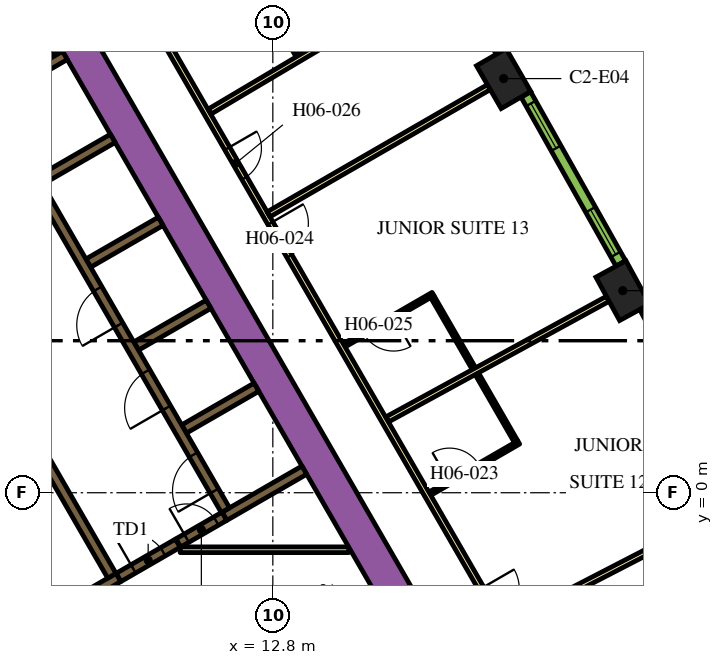
"""IFC4 building model, lengths in metres.
Left out: names, types, materials, properties, quantities, classifications, styles, units other than length and angle.
Written with IfcOpenShell. Run it as: python <this file> out.ifc"""

import sys

from ifc_helpers import new_model, si_unit, direction, frame, frame_2d, origin, origin_2d, place, context, subcontext, project, spatial, rectangle, extrude, element, fill, save


model = new_model("IFC4")
c1 = context("Model", 3, precision=1e-05, world=origin(), true_north=direction((0.0, 1.0)))
c2 = subcontext(c1, "Body", "Model", "MODEL_VIEW")
j1 = project(units=[si_unit("LENGTHUNIT", "METRE"), si_unit("PLANEANGLEUNIT", "RADIAN")], contexts=[c1])
p1 = place(None, origin())
s1 = spatial("IfcSite", under=j1, at=p1, CompositionType="ELEMENT")
p2 = place(p1, origin())
s2 = spatial("IfcBuilding", under=s1, at=p2, CompositionType="ELEMENT")
p3 = place(p2, frame((0.0, 0.0, 91.5)))
s3 = spatial("IfcBuildingStorey", under=s2, at=p3, CompositionType="ELEMENT", Elevation=91.5)
for number, where, z_axis, x_axis in (
    (1, (22.009, 5.317, 0.0), (0.0, 0.0, 1.0), (-0.48, 0.877, 0.0)),
    (2, (18.874, 10.897, 0.0), (0.0, 0.0, 1.0), (-0.5, 0.866, 0.0)),
):
    element("IfcColumn", number, at=place(p3, frame(where, z_axis=z_axis, x_axis=x_axis)), inside=s3, PredefinedType="COLUMN", context=c2, shape_type="SweptSolid", body=[
        extrude(rectangle(XDim=1.3, YDim=0.9, at=origin_2d()), origin(), (0.0, 0.0, 1.0), 3.9),
    ])
p4 = place(p3, frame((6.776, 13.364, 0.0), z_axis=(0.0, 0.0, 1.0), x_axis=(0.500004177138, -0.8660229921, 0.0)))
e3 = element("IfcWall", 3, at=p4, inside=s3, PredefinedType="SOLIDWALL", context=c2, shape_type="SweptSolid", body=[
    extrude(rectangle(XDim=20.204, YDim=0.9, at=frame_2d((10.102, 0.0))), origin(), (0.0, 0.0, 1.0), 3.9),
])
p5 = place(p3, frame((10.464, 1.677, 0.0), z_axis=(0.0, 0.0, 1.0), x_axis=(0.86605622881, 0.499946605688, 0.0)))
e4 = element("IfcWall", 4, at=p5, inside=s3, PredefinedType="SOLIDWALL", context=c2, shape_type="SweptSolid", body=[
    extrude(rectangle(XDim=2.2, YDim=0.25, at=frame_2d((1.1, 0.0))), origin(), (0.0, 0.0, 1.0), 3.9),
])
p6 = place(p3, frame((13.629, 0.594, 0.0), z_axis=(0.0, 0.0, 1.0), x_axis=(-0.866063384774, -0.499934209226, 0.0)))
e5 = element("IfcWall", 5, at=p6, inside=s3, PredefinedType="SOLIDWALL", context=c2, shape_type="SweptSolid", body=[
    extrude(rectangle(XDim=2.428, YDim=0.25, at=frame_2d((1.214, 0.0))), origin(), (0.0, 0.0, 1.0), 3.9),
])
p7 = place(p3, frame((5.356, 10.367, 0.0), z_axis=(0.0, 0.0, 1.0), x_axis=(0.865978535641, 0.50008116922, 0.0)))
e6 = element("IfcWall", 6, at=p7, inside=s3, PredefinedType="SOLIDWALL", context=c2, shape_type="SweptSolid", body=[
    extrude(rectangle(XDim=2.278, YDim=0.25, at=frame_2d((1.139, 0.0))), origin(), (0.0, 0.0, 1.0), 3.9),
])
p8 = place(p3, frame((6.614, -3.456, 0.0), z_axis=(0.0, 0.0, 1.0), x_axis=(0.866031582473, 0.499989298045, 0.0)))
e7 = element("IfcWall", 7, at=p8, inside=s3, PredefinedType="SOLIDWALL", context=c2, shape_type="SweptSolid", body=[
    extrude(rectangle(XDim=2.455, YDim=0.25, at=frame_2d((1.228, 0.0))), origin(), (0.0, 0.0, 1.0), 3.9),
])
for number, where, z_axis, x_axis in (
    (8, (6.684, 8.224, 0.0), (0.0, 0.0, 1.0), (0.866, 0.5, 0.0)),
    (9, (7.944, 6.041, 0.0), (0.0, 0.0, 1.0), (0.866, 0.5, 0.0)),
    (10, (9.204, 3.859, 0.0), (0.0, 0.0, 1.0), (0.866, 0.5, 0.0)),
):
    element("IfcWall", number, at=place(p3, frame(where, z_axis=z_axis, x_axis=x_axis)), inside=s3, PredefinedType="SOLIDWALL", context=c2, shape_type="SweptSolid", body=[
        extrude(rectangle(XDim=2.2, YDim=0.25, at=frame_2d((1.1, 0.0))), origin(), (0.0, 0.0, 1.0), 3.9),
    ])
p9 = place(p3, frame((10.362, -1.5, 0.0), z_axis=(0.0, 0.0, 1.0), x_axis=(1.0, 0.0, 0.0)))
e11 = element("IfcWall", 11, at=p9, inside=s3, PredefinedType="PARTITIONING", context=c2, shape_type="SweptSolid", body=[
    extrude(rectangle(XDim=4.439, YDim=0.15, at=frame_2d((2.22, 0.0))), origin(), (0.0, 0.0, 1.0), 2.75),
])
p10 = place(p3, frame((6.872, 11.45, 0.0), z_axis=(0.0, 0.0, 1.0), x_axis=(0.499846793097, 0.866113839764, 0.0)))
e12 = element("IfcWall", 12, at=p10, inside=s3, PredefinedType="PARTITIONING", context=c2, shape_type="SweptSolid", body=[
    extrude(rectangle(XDim=0.453, YDim=0.15, at=frame_2d((0.227, 0.0))), origin(), (0.0, 0.0, 1.0), 2.75),
])
p11 = place(p3, frame((7.131, 11.6, 0.0), z_axis=(0.0, 0.0, 1.0), x_axis=(0.498600033135, 0.866832167699, 0.0)))
e13 = element("IfcWall", 13, at=p11, inside=s3, PredefinedType="PARTITIONING", context=c2, shape_type="SweptSolid", body=[
    extrude(rectangle(XDim=0.107, YDim=0.15, at=frame_2d((0.053, 0.0))), origin(), (0.0, 0.0, 1.0), 2.75),
])
p12 = place(p3, frame((11.553, -0.46, 0.0), z_axis=(0.0, 0.0, 1.0), x_axis=(-0.500006514828, 0.866021642414, 0.0)))
e14 = element("IfcWall", 14, at=p12, inside=s3, PredefinedType="SOLIDWALL", context=c2, shape_type="SweptSolid", body=[
    extrude(rectangle(XDim=12.35, YDim=0.25, at=frame_2d((6.175, 0.0))), origin(), (0.0, 0.0, 1.0), 3.9),
])
p13 = place(p12, frame((0.585, 0.0, 0.0)))
e15 = element("IfcOpeningElement", 15, at=p13, cuts=e14, PredefinedType="OPENING", context=c2, shape_type="SweptSolid", body=[
    extrude(rectangle(XDim=1.1, YDim=2.1, at=frame_2d((0.55, 1.05))), frame((0.0, 0.135, 0.0), z_axis=(0.0, -1.0, 0.0), x_axis=(1.0, 0.0, 0.0)), (0.0, 0.0, 1.0), 0.27),
])
p14 = place(p12, frame((3.105, 0.0, 0.0)))
e16 = element("IfcOpeningElement", 16, at=p14, cuts=e14, PredefinedType="OPENING", context=c2, shape_type="SweptSolid", body=[
    extrude(rectangle(XDim=1.1, YDim=2.1, at=frame_2d((0.55, 1.05))), frame((0.0, 0.135, 0.0), z_axis=(0.0, -1.0, 0.0), x_axis=(1.0, 0.0, 0.0)), (0.0, 0.0, 1.0), 0.27),
])
p15 = place(p12, frame((5.625, 0.0, 0.0)))
e17 = element("IfcOpeningElement", 17, at=p15, cuts=e14, PredefinedType="OPENING", context=c2, shape_type="SweptSolid", body=[
    extrude(rectangle(XDim=1.1, YDim=2.1, at=frame_2d((0.55, 1.05))), frame((0.0, 0.135, 0.0), z_axis=(0.0, -1.0, 0.0), x_axis=(1.0, 0.0, 0.0)), (0.0, 0.0, 1.0), 0.27),
])
p16 = place(p3, frame((8.565, -2.185, 0.0), z_axis=(0.0, 0.0, 1.0), x_axis=(-0.499997954832, 0.866026584559, 0.0)))
e18 = element("IfcWall", 18, at=p16, inside=s3, PredefinedType="SOLIDWALL", context=c2, shape_type="SweptSolid", body=[
    extrude(rectangle(XDim=12.35, YDim=0.25, at=frame_2d((6.175, 0.0))), origin(), (0.0, 0.0, 1.0), 3.9),
])
p17 = place(p16, frame((5.725, 0.0, 0.0)))
e19 = element("IfcOpeningElement", 19, at=p17, cuts=e18, PredefinedType="OPENING", context=c2, shape_type="SweptSolid", body=[
    extrude(rectangle(XDim=0.9, YDim=2.1, at=frame_2d((0.45, 1.05))), frame((0.0, 0.135, 0.0), z_axis=(0.0, -1.0, 0.0), x_axis=(1.0, 0.0, 0.0)), (0.0, 0.0, 1.0), 0.27),
])
p18 = place(p3, frame((8.74, -2.229, 0.0), z_axis=(0.0, 0.0, 1.0), x_axis=(0.865989075817, 0.500062916607, 0.0)))
e20 = element("IfcWall", 20, at=p18, inside=s3, PredefinedType="SOLIDWALL", context=c2, shape_type="SweptSolid", body=[
    extrude(rectangle(XDim=1.8, YDim=0.25, at=frame_2d((0.9, 0.0))), origin(), (0.0, 0.0, 1.0), 3.9),
])
p19 = place(p18, frame((0.45, 0.0, 0.0)))
e21 = element("IfcOpeningElement", 21, at=p19, cuts=e20, PredefinedType="OPENING", context=c2, shape_type="SweptSolid", body=[
    extrude(rectangle(XDim=0.9, YDim=2.1, at=frame_2d((0.45, 1.05))), frame((0.0, 0.135, 0.0), z_axis=(0.0, -1.0, 0.0), x_axis=(1.0, 0.0, 0.0)), (0.0, 0.0, 1.0), 0.27),
])
p20 = place(p3, frame((10.313, -1.32, 0.0), z_axis=(0.0, 0.0, 1.0), x_axis=(0.866034573852, 0.49998411664, 0.0)))
e22 = element("IfcWall", 22, at=p20, inside=s3, PredefinedType="SOLIDWALL", context=c2, shape_type="SweptSolid", body=[
    extrude(rectangle(XDim=1.4, YDim=0.25, at=frame_2d((0.7, 0.0))), origin(), (0.0, 0.0, 1.0), 3.9),
])
p21 = place(p20, frame((0.25, 0.0, 0.0)))
e23 = element("IfcOpeningElement", 23, at=p21, cuts=e22, PredefinedType="OPENING", context=c2, shape_type="SweptSolid", body=[
    extrude(rectangle(XDim=0.9, YDim=2.1, at=frame_2d((0.45, 1.05))), frame((0.0, 0.135, 0.0), z_axis=(0.0, -1.0, 0.0), x_axis=(1.0, 0.0, 0.0)), (0.0, 0.0, 1.0), 0.27),
])
p22 = place(p3, frame((6.163, 18.475, 0.0), z_axis=(0.0, 0.0, 1.0), x_axis=(0.500001317485, -0.866024643133, 0.0)))
e24 = element("IfcWall", 24, at=p22, inside=s3, PredefinedType="PARTITIONING", context=c2, shape_type="SweptSolid", body=[
    extrude(rectangle(XDim=25.767, YDim=0.15, at=frame_2d((12.883, 0.0))), origin(), (0.0, 0.0, 1.0), 2.75),
])
p23 = place(p22, frame((24.241, 0.0, 0.0)))
e25 = element("IfcOpeningElement", 25, at=p23, cuts=e24, PredefinedType="OPENING", context=c2, shape_type="SweptSolid", body=[
    extrude(rectangle(XDim=1.0, YDim=2.1, at=frame_2d((0.5, 1.05))), frame((0.0, 0.085, 0.0), z_axis=(0.0, -1.0, 0.0), x_axis=(1.0, 0.0, 0.0)), (0.0, 0.0, 1.0), 0.17),
])
p24 = place(p22, frame((13.144, 0.0, 0.0)))
e26 = element("IfcOpeningElement", 26, at=p24, cuts=e24, PredefinedType="OPENING", context=c2, shape_type="SweptSolid", body=[
    extrude(rectangle(XDim=1.0, YDim=2.1, at=frame_2d((0.5, 1.05))), frame((0.0, 0.085, 0.0), z_axis=(0.0, -1.0, 0.0), x_axis=(1.0, 0.0, 0.0)), (0.0, 0.0, 1.0), 0.17),
])
p25 = place(p22, frame((10.874, 0.0, 0.0)))
e27 = element("IfcOpeningElement", 27, at=p25, cuts=e24, PredefinedType="OPENING", context=c2, shape_type="SweptSolid", body=[
    extrude(rectangle(XDim=0.9, YDim=2.1, at=frame_2d((0.45, 1.05))), frame((0.0, 0.085, 0.0), z_axis=(0.0, -1.0, 0.0), x_axis=(1.0, 0.0, 0.0)), (0.0, 0.0, 1.0), 0.17),
])
p26 = place(p22, frame((3.718, 0.0, 0.0)))
e28 = element("IfcOpeningElement", 28, at=p26, cuts=e24, PredefinedType="OPENING", context=c2, shape_type="SweptSolid", body=[
    extrude(rectangle(XDim=1.1, YDim=2.1, at=frame_2d((0.55, 1.05))), frame((0.0, 0.085, 0.0), z_axis=(0.0, -1.0, 0.0), x_axis=(1.0, 0.0, 0.0)), (0.0, 0.0, 1.0), 0.17),
])
p27 = place(p22, frame((2.411, 0.0, 0.0)))
e29 = element("IfcOpeningElement", 29, at=p27, cuts=e24, PredefinedType="OPENING", context=c2, shape_type="SweptSolid", body=[
    extrude(rectangle(XDim=1.0, YDim=2.1, at=frame_2d((0.5, 1.05))), frame((0.0, 0.085, 0.0), z_axis=(0.0, -1.0, 0.0), x_axis=(1.0, 0.0, 0.0)), (0.0, 0.0, 1.0), 0.17),
])
p28 = place(p3, frame((17.379, 13.731, 0.0), z_axis=(0.0, 0.0, 1.0), x_axis=(-0.860132461691, -0.510070728768, 0.0)))
e30 = element("IfcWall", 30, at=p28, inside=s3, PredefinedType="PARTITIONING", context=c2, shape_type="SweptSolid", body=[
    extrude(rectangle(XDim=7.257, YDim=0.15, at=frame_2d((3.628, 0.0))), origin(), (0.0, 0.0, 1.0), 2.75),
])
p29 = place(p3, frame((18.484, 10.672, 0.0), z_axis=(0.0, 0.0, 1.0), x_axis=(-0.866019162053, -0.50001081084, 0.0)))
e31 = element("IfcWall", 31, at=p29, inside=s3, PredefinedType="PARTITIONING", context=c2, shape_type="SweptSolid", body=[
    extrude(rectangle(XDim=6.694, YDim=0.15, at=frame_2d((3.347, 0.0))), origin(), (0.0, 0.0, 1.0), 2.75),
])
p30 = place(p3, frame((21.614, 5.102, 0.0), z_axis=(0.0, 0.0, 1.0), x_axis=(-0.877484555087, -0.479604895287, 0.0)))
e32 = element("IfcWall", 32, at=p30, inside=s3, PredefinedType="PARTITIONING", context=c2, shape_type="SweptSolid", body=[
    extrude(rectangle(XDim=6.611, YDim=0.15, at=frame_2d((3.306, 0.0))), origin(), (0.0, 0.0, 1.0), 2.75),
])
p31 = place(p3, frame((24.613, -0.541, 0.0), z_axis=(0.0, 0.0, 1.0), x_axis=(-0.888459912519, -0.458954228487, 0.0)))
e33 = element("IfcWall", 33, at=p31, inside=s3, PredefinedType="PARTITIONING", context=c2, shape_type="SweptSolid", body=[
    extrude(rectangle(XDim=6.392, YDim=0.15, at=frame_2d((3.196, 0.0))), origin(), (0.0, 0.0, 1.0), 2.75),
])
p32 = place(p3, frame((16.931, -0.026, 0.0), z_axis=(0.0, 0.0, 1.0), x_axis=(0.866059108428, 0.4999416173, 0.0)))
e34 = element("IfcWall", 34, at=p32, inside=s3, PredefinedType="PARTITIONING", context=c2, shape_type="SweptSolid", body=[
    extrude(rectangle(XDim=2.7, YDim=0.1, at=frame_2d((1.35, 0.0))), origin(), (0.0, 0.0, 1.0), 2.75),
])
p33 = place(p32, frame((0.6, 0.0, 0.0)))
e35 = element("IfcOpeningElement", 35, at=p33, cuts=e34, PredefinedType="OPENING", context=c2, shape_type="SweptSolid", body=[
    extrude(rectangle(XDim=0.9, YDim=2.1, at=frame_2d((0.45, 1.05))), frame((0.0, 0.06, 0.0), z_axis=(0.0, -1.0, 0.0), x_axis=(1.0, 0.0, 0.0)), (0.0, 0.0, 1.0), 0.12),
])
p34 = place(p3, frame((19.196, 1.351, 0.0), z_axis=(0.0, 0.0, 1.0), x_axis=(-0.499956128963, 0.866050731258, 0.0)))
e36 = element("IfcWall", 36, at=p34, inside=s3, PredefinedType="PARTITIONING", context=c2, shape_type="SweptSolid", body=[
    extrude(rectangle(XDim=2.05, YDim=0.1, at=frame_2d((1.025, 0.0))), origin(), (0.0, 0.0, 1.0), 2.75),
])
p35 = place(p3, frame((17.016, 5.228, 0.0), z_axis=(0.0, 0.0, 1.0), x_axis=(-0.86599734893, -0.500048589285, 0.0)))
e37 = element("IfcWall", 37, at=p35, inside=s3, PredefinedType="PARTITIONING", context=c2, shape_type="SweptSolid", body=[
    extrude(rectangle(XDim=2.7, YDim=0.1, at=frame_2d((1.35, 0.0))), origin(), (0.0, 0.0, 1.0), 2.75),
])
p36 = place(p35, frame((1.2, 0.0, 0.0)))
e38 = element("IfcOpeningElement", 38, at=p36, cuts=e37, PredefinedType="OPENING", context=c2, shape_type="SweptSolid", body=[
    extrude(rectangle(XDim=0.9, YDim=2.1, at=frame_2d((0.45, 1.05))), frame((0.0, 0.06, 0.0), z_axis=(0.0, -1.0, 0.0), x_axis=(1.0, 0.0, 0.0)), (0.0, 0.0, 1.0), 0.12),
])
p37 = place(p3, frame((16.997, 5.16, 0.0), z_axis=(0.0, 0.0, 1.0), x_axis=(0.500011965869, -0.866018495177, 0.0)))
e39 = element("IfcWall", 39, at=p37, inside=s3, PredefinedType="PARTITIONING", context=c2, shape_type="SweptSolid", body=[
    extrude(rectangle(XDim=2.19, YDim=0.1, at=frame_2d((1.095, 0.0))), origin(), (0.0, 0.0, 1.0), 2.75),
])
p38 = place(p3, frame((12.259, 13.567, 0.0), z_axis=(0.0, 0.0, 1.0), x_axis=(0.500017192868, -0.86601547725, 0.0)))
e40 = element("IfcWall", 40, at=p38, inside=s3, PredefinedType="PARTITIONING", context=c2, shape_type="SweptSolid", body=[
    extrude(rectangle(XDim=2.39, YDim=0.1, at=frame_2d((1.195, 0.0))), origin(), (0.0, 0.0, 1.0), 2.75),
])
p39 = place(p3, frame((24.977, 0.383, 0.0), z_axis=(0.0, 0.0, 1.0), x_axis=(-0.469323203119, 0.883026461106, 0.0)))
e41 = element("IfcWall", 41, at=p39, inside=s3, PredefinedType="SOLIDWALL", context=c2, shape_type="SweptSolid", body=[
    extrude(rectangle(XDim=5.101, YDim=0.29, at=frame_2d((2.55, 0.0))), origin(), (0.0, 0.0, 1.0), 3.65),
])
p40 = place(p39, frame((0.273, 0.0, 0.9)))
e42 = element("IfcOpeningElement", 42, at=p40, cuts=e41, PredefinedType="OPENING", context=c2, shape_type="SweptSolid", body=[
    extrude(rectangle(XDim=1.35, YDim=2.15, at=frame_2d((0.675, 1.075))), frame((0.0, 0.155, 0.0), z_axis=(0.0, -1.0, 0.0), x_axis=(1.0, 0.0, 0.0)), (0.0, 0.0, 1.0), 0.31),
])
p41 = place(p39, frame((3.478, 0.0, 0.9)))
e43 = element("IfcOpeningElement", 43, at=p41, cuts=e41, PredefinedType="OPENING", context=c2, shape_type="SweptSolid", body=[
    extrude(rectangle(XDim=1.35, YDim=2.15, at=frame_2d((0.675, 1.075))), frame((0.0, 0.155, 0.0), z_axis=(0.0, -1.0, 0.0), x_axis=(1.0, 0.0, 0.0)), (0.0, 0.0, 1.0), 0.31),
])
p42 = place(p3, frame((21.956, 6.033, 0.0), z_axis=(0.0, 0.0, 1.0), x_axis=(-0.48983164787, 0.87181704316, 0.0)))
e44 = element("IfcWall", 44, at=p42, inside=s3, PredefinedType="SOLIDWALL", context=c2, shape_type="SweptSolid", body=[
    extrude(rectangle(XDim=5.1, YDim=0.29, at=frame_2d((2.55, 0.0))), origin(), (0.0, 0.0, 1.0), 3.65),
])
p43 = place(p42, frame((0.273, 0.0, 0.9)))
e45 = element("IfcOpeningElement", 45, at=p43, cuts=e44, PredefinedType="OPENING", context=c2, shape_type="SweptSolid", body=[
    extrude(rectangle(XDim=1.35, YDim=2.15, at=frame_2d((0.675, 1.075))), frame((0.0, 0.155, 0.0), z_axis=(0.0, -1.0, 0.0), x_axis=(1.0, 0.0, 0.0)), (0.0, 0.0, 1.0), 0.31),
])
p44 = place(p42, frame((3.478, 0.0, 0.9)))
e46 = element("IfcOpeningElement", 46, at=p44, cuts=e44, PredefinedType="OPENING", context=c2, shape_type="SweptSolid", body=[
    extrude(rectangle(XDim=1.35, YDim=2.15, at=frame_2d((0.675, 1.075))), frame((0.0, 0.155, 0.0), z_axis=(0.0, -1.0, 0.0), x_axis=(1.0, 0.0, 0.0)), (0.0, 0.0, 1.0), 0.31),
])
p45 = place(p3, frame((18.805, 11.611, 0.0), z_axis=(0.0, 0.0, 1.0), x_axis=(-0.510054281659, 0.860142214847, 0.0)))
e47 = element("IfcWall", 47, at=p45, inside=s3, PredefinedType="SOLIDWALL", context=c2, shape_type="SweptSolid", body=[
    extrude(rectangle(XDim=5.101, YDim=0.29, at=frame_2d((2.55, 0.0))), origin(), (0.0, 0.0, 1.0), 3.65),
])
p46 = place(p45, frame((0.273, 0.0, 0.9)))
e48 = element("IfcOpeningElement", 48, at=p46, cuts=e47, PredefinedType="OPENING", context=c2, shape_type="SweptSolid", body=[
    extrude(rectangle(XDim=1.35, YDim=2.15, at=frame_2d((0.675, 1.075))), frame((0.0, 0.155, 0.0), z_axis=(0.0, -1.0, 0.0), x_axis=(1.0, 0.0, 0.0)), (0.0, 0.0, 1.0), 0.31),
])
p47 = place(p45, frame((3.478, 0.0, 0.9)))
e49 = element("IfcOpeningElement", 49, at=p47, cuts=e47, PredefinedType="OPENING", context=c2, shape_type="SweptSolid", body=[
    extrude(rectangle(XDim=1.35, YDim=2.15, at=frame_2d((0.675, 1.075))), frame((0.0, 0.155, 0.0), z_axis=(0.0, -1.0, 0.0), x_axis=(1.0, 0.0, 0.0)), (0.0, 0.0, 1.0), 0.31),
])
p48 = place(p13, origin())
e50 = element("IfcDoor", 50, at=p48, inside=s3, OperationType="DOUBLE_DOOR_SLIDING", PredefinedType="DOOR", context=c2, shape_type="SweptSolid", body=[
    extrude(rectangle(XDim=1.1, YDim=2.1, at=frame_2d((0.55, 1.05))), frame((0.0, 0.025, 0.0), z_axis=(0.0, -1.0, 0.0), x_axis=(1.0, 0.0, 0.0)), (0.0, 0.0, 1.0), 0.05),
])
fill(e15, e50)
p49 = place(p14, origin())
e51 = element("IfcDoor", 51, at=p49, inside=s3, OperationType="DOUBLE_DOOR_SLIDING", PredefinedType="DOOR", context=c2, shape_type="SweptSolid", body=[
    extrude(rectangle(XDim=1.1, YDim=2.1, at=frame_2d((0.55, 1.05))), frame((0.0, 0.025, 0.0), z_axis=(0.0, -1.0, 0.0), x_axis=(1.0, 0.0, 0.0)), (0.0, 0.0, 1.0), 0.05),
])
fill(e16, e51)
p50 = place(p15, origin())
e52 = element("IfcDoor", 52, at=p50, inside=s3, OperationType="DOUBLE_DOOR_SLIDING", PredefinedType="DOOR", context=c2, shape_type="SweptSolid", body=[
    extrude(rectangle(XDim=1.1, YDim=2.1, at=frame_2d((0.55, 1.05))), frame((0.0, 0.025, 0.0), z_axis=(0.0, -1.0, 0.0), x_axis=(1.0, 0.0, 0.0)), (0.0, 0.0, 1.0), 0.05),
])
fill(e17, e52)
p51 = place(p19, origin())
e53 = element("IfcDoor", 53, at=p51, inside=s3, OperationType="SINGLE_SWING_LEFT", PredefinedType="DOOR", context=c2, shape_type="SweptSolid", body=[
    extrude(rectangle(XDim=0.9, YDim=2.1, at=frame_2d((0.45, 1.05))), frame((0.0, 0.025, 0.0), z_axis=(0.0, -1.0, 0.0), x_axis=(1.0, 0.0, 0.0)), (0.0, 0.0, 1.0), 0.05),
])
fill(e21, e53)
p52 = place(p21, origin())
e54 = element("IfcDoor", 54, at=p52, inside=s3, OperationType="SINGLE_SWING_LEFT", PredefinedType="DOOR", context=c2, shape_type="SweptSolid", body=[
    extrude(rectangle(XDim=0.9, YDim=2.1, at=frame_2d((0.45, 1.05))), frame((0.0, 0.025, 0.0), z_axis=(0.0, -1.0, 0.0), x_axis=(1.0, 0.0, 0.0)), (0.0, 0.0, 1.0), 0.05),
])
fill(e23, e54)
p53 = place(p33, origin())
e55 = element("IfcDoor", 55, at=p53, inside=s3, OperationType="SINGLE_SWING_RIGHT", PredefinedType="DOOR", context=c2, shape_type="SweptSolid", body=[
    extrude(rectangle(XDim=0.9, YDim=2.1, at=frame_2d((0.45, 1.05))), frame((0.0, 0.025, 0.0), z_axis=(0.0, -1.0, 0.0), x_axis=(1.0, 0.0, 0.0)), (0.0, 0.0, 1.0), 0.05),
])
fill(e35, e55)
p54 = place(p24, origin())
e56 = element("IfcDoor", 56, at=p54, inside=s3, OperationType="SINGLE_SWING_LEFT", PredefinedType="DOOR", context=c2, shape_type="SweptSolid", body=[
    extrude(rectangle(XDim=1.0, YDim=2.1, at=frame_2d((0.5, 1.05))), frame((0.0, 0.025, 0.0), z_axis=(0.0, -1.0, 0.0), x_axis=(1.0, 0.0, 0.0)), (0.0, 0.0, 1.0), 0.05),
])
fill(e26, e56)
p55 = place(p36, origin())
e57 = element("IfcDoor", 57, at=p55, inside=s3, OperationType="SINGLE_SWING_LEFT", PredefinedType="DOOR", context=c2, shape_type="SweptSolid", body=[
    extrude(rectangle(XDim=0.9, YDim=2.1, at=frame_2d((0.45, 1.05))), frame((0.0, 0.025, 0.0), z_axis=(0.0, -1.0, 0.0), x_axis=(1.0, 0.0, 0.0)), (0.0, 0.0, 1.0), 0.05),
])
fill(e38, e57)
p56 = place(p25, origin())
e58 = element("IfcDoor", 58, at=p56, inside=s3, OperationType="SINGLE_SWING_RIGHT", PredefinedType="DOOR", context=c2, shape_type="SweptSolid", body=[
    extrude(rectangle(XDim=0.9, YDim=2.1, at=frame_2d((0.45, 1.05))), frame((0.0, 0.025, 0.0), z_axis=(0.0, -1.0, 0.0), x_axis=(1.0, 0.0, 0.0)), (0.0, 0.0, 1.0), 0.05),
])
fill(e27, e58)
p57 = place(p43, origin())
e59 = element("IfcWindow", 59, at=p57, inside=s3, PartitioningType="DOUBLE_PANEL_VERTICAL", PredefinedType="WINDOW", context=c2, shape_type="SweptSolid", body=[
    extrude(rectangle(XDim=1.35, YDim=2.15, at=frame_2d((0.675, 1.075))), frame((0.0, 0.015, 0.0), z_axis=(0.0, -1.0, 0.0), x_axis=(1.0, 0.0, 0.0)), (0.0, 0.0, 1.0), 0.06),
])
fill(e45, e59)
p58 = place(p44, origin())
e60 = element("IfcWindow", 60, at=p58, inside=s3, PartitioningType="DOUBLE_PANEL_VERTICAL", PredefinedType="WINDOW", context=c2, shape_type="SweptSolid", body=[
    extrude(rectangle(XDim=1.35, YDim=2.15, at=frame_2d((0.675, 1.075))), frame((0.0, 0.015, 0.0), z_axis=(0.0, -1.0, 0.0), x_axis=(1.0, 0.0, 0.0)), (0.0, 0.0, 1.0), 0.06),
])
fill(e46, e60)
save(model, sys.argv[1])
